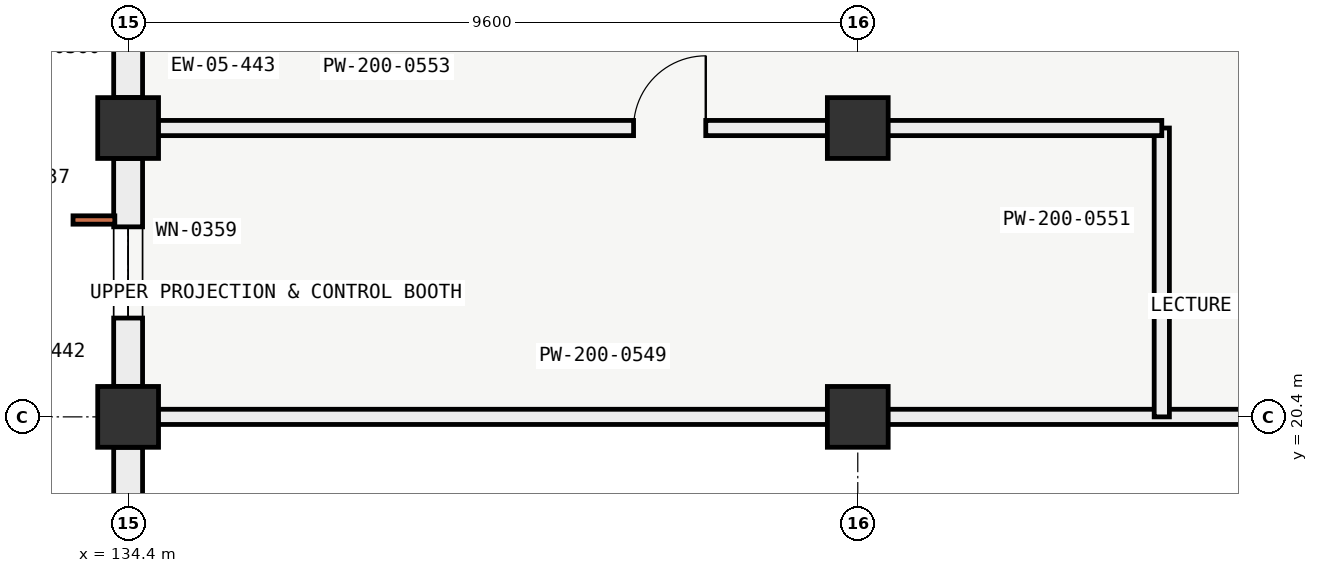
"""IFC4 building model, lengths in metres.
Left out: names, types, materials, properties, quantities, classifications, styles, units other than length and angle.
Written with IfcOpenShell. Run it as: python <this file> out.ifc"""

import sys

from ifc_helpers import new_model, si_unit, direction, frame, frame_2d, origin, origin_2d, place, context, subcontext, project, spatial, rectangle, extrude, element, fill, save


model = new_model("IFC4")
c1 = context("Model", 3, precision=1e-05, world=origin(), true_north=direction((0.0, 1.0)))
c2 = subcontext(c1, "Body", "Model", "MODEL_VIEW")
j1 = project(units=[si_unit("LENGTHUNIT", "METRE"), si_unit("PLANEANGLEUNIT", "RADIAN")], contexts=[c1])
p1 = place(None, origin())
s1 = spatial("IfcSite", under=j1, at=p1, CompositionType="ELEMENT")
p2 = place(p1, origin())
s2 = spatial("IfcBuilding", under=s1, at=p2, CompositionType="ELEMENT")
p3 = place(p2, frame((0.0, 0.0, 5.4)))
s3 = spatial("IfcBuildingStorey", under=s2, at=p3, CompositionType="ELEMENT", Elevation=5.4)
for number, where, z_axis, x_axis in (
    (1, (134.4, 20.4, 0.0), (0.0, 0.0, 1.0), (1.0, 0.0, 0.0)),
    (2, (134.4, 24.2, 0.0), (0.0, 0.0, 1.0), (1.0, 0.0, 0.0)),
    (3, (144.0, 20.4, 0.0), (0.0, 0.0, 1.0), (1.0, 0.0, 0.0)),
    (4, (144.0, 24.2, 0.0), (0.0, 0.0, 1.0), (1.0, 0.0, 0.0)),
):
    element("IfcColumn", number, at=place(p3, frame(where, z_axis=z_axis, x_axis=x_axis)), inside=s3, PredefinedType="COLUMN", context=c2, shape_type="SweptSolid", body=[
        extrude(rectangle(XDim=0.8, YDim=0.8, at=origin_2d()), origin(), (0.0, 0.0, 1.0), 4.2),
    ])
p4 = place(p3, frame((134.4, 10.601, 0.0), z_axis=(0.0, 0.0, 1.0), x_axis=(0.0, 1.0, 0.0)))
e5 = element("IfcWall", 5, at=p4, inside=s3, PredefinedType="SOLIDWALL", context=c2, shape_type="SweptSolid", body=[
    extrude(rectangle(XDim=9.398, YDim=0.38, at=frame_2d((4.699, 0.0))), origin(), (0.0, 0.0, 1.0), 2.2),
])
p5 = place(p4, frame((1.35, 0.0, 0.85)))
e6 = element("IfcOpeningElement", 6, at=p5, cuts=e5, PredefinedType="OPENING", context=c2, shape_type="SweptSolid", body=[
    extrude(rectangle(XDim=0.75, YDim=1.1, at=frame_2d((0.375, 0.55))), frame((0.0, 0.2, 0.0), z_axis=(0.0, -1.0, 0.0), x_axis=(1.0, 0.0, 0.0)), (0.0, 0.0, 1.0), 0.4),
])
p6 = place(p4, frame((5.25, 0.0, 0.85)))
e7 = element("IfcOpeningElement", 7, at=p6, cuts=e5, PredefinedType="OPENING", context=c2, shape_type="SweptSolid", body=[
    extrude(rectangle(XDim=0.75, YDim=1.1, at=frame_2d((0.375, 0.55))), frame((0.0, 0.2, 0.0), z_axis=(0.0, -1.0, 0.0), x_axis=(1.0, 0.0, 0.0)), (0.0, 0.0, 1.0), 0.4),
])
p7 = place(p3, frame((134.4, 20.801, 0.0), z_axis=(0.0, 0.0, 1.0), x_axis=(0.0, 1.0, 0.0)))
e8 = element("IfcWall", 8, at=p7, inside=s3, PredefinedType="SOLIDWALL", context=c2, shape_type="SweptSolid", body=[
    extrude(rectangle(XDim=2.998, YDim=0.38, at=frame_2d((1.499, 0.0))), origin(), (0.0, 0.0, 1.0), 3.25),
])
p8 = place(p7, frame((0.899, 0.0, 0.9)))
e9 = element("IfcOpeningElement", 9, at=p8, cuts=e8, PredefinedType="OPENING", context=c2, shape_type="SweptSolid", body=[
    extrude(rectangle(XDim=1.2, YDim=1.8, at=frame_2d((0.6, 0.9))), frame((0.0, 0.2, 0.0), z_axis=(0.0, -1.0, 0.0), x_axis=(1.0, 0.0, 0.0)), (0.0, 0.0, 1.0), 0.4),
])
p9 = place(p3, frame((134.4, 24.601, 0.0), z_axis=(0.0, 0.0, 1.0), x_axis=(0.0, 1.0, 0.0)))
e10 = element("IfcWall", 10, at=p9, inside=s3, PredefinedType="SOLIDWALL", context=c2, shape_type="SweptSolid", body=[
    extrude(rectangle(XDim=2.398, YDim=0.38, at=frame_2d((1.199, 0.0))), origin(), (0.0, 0.0, 1.0), 3.25),
])
p10 = place(p9, frame((0.824, 0.0, 0.75)))
e11 = element("IfcOpeningElement", 11, at=p10, cuts=e10, PredefinedType="OPENING", context=c2, shape_type="SweptSolid", body=[
    extrude(rectangle(XDim=0.75, YDim=1.1, at=frame_2d((0.375, 0.55))), frame((0.0, 0.2, 0.0), z_axis=(0.0, -1.0, 0.0), x_axis=(1.0, 0.0, 0.0)), (0.0, 0.0, 1.0), 0.4),
])
p11 = place(p3, frame((134.55, 20.4, 0.0), z_axis=(0.0, 0.0, 1.0), x_axis=(1.0, 0.0, 0.0)))
e12 = element("IfcWall", 12, at=p11, inside=s3, PredefinedType="PARTITIONING", context=c2, shape_type="SweptSolid", body=[
    extrude(rectangle(XDim=19.05, YDim=0.2, at=frame_2d((9.525, 0.0))), origin(), (0.0, 0.0, 1.0), 3.2),
])
p12 = place(p3, frame((148.0, 20.4, 0.0), z_axis=(0.0, 0.0, 1.0), x_axis=(0.0, 1.0, 0.0)))
e13 = element("IfcWall", 13, at=p12, inside=s3, PredefinedType="PARTITIONING", context=c2, shape_type="SweptSolid", body=[
    extrude(rectangle(XDim=3.8, YDim=0.2, at=frame_2d((1.9, 0.0))), origin(), (0.0, 0.0, 1.0), 3.2),
])
p13 = place(p3, frame((134.55, 24.2, 0.0), z_axis=(0.0, 0.0, 1.0), x_axis=(1.0, 0.0, 0.0)))
e14 = element("IfcWall", 14, at=p13, inside=s3, PredefinedType="PARTITIONING", context=c2, shape_type="SweptSolid", body=[
    extrude(rectangle(XDim=13.45, YDim=0.2, at=frame_2d((6.725, 0.0))), origin(), (0.0, 0.0, 1.0), 3.25),
])
p14 = place(p13, frame((6.5, 0.0, 0.0)))
e15 = element("IfcOpeningElement", 15, at=p14, cuts=e14, PredefinedType="OPENING", context=c2, shape_type="SweptSolid", body=[
    extrude(rectangle(XDim=0.95, YDim=2.1, at=frame_2d((0.475, 1.05))), frame((0.0, 0.11, 0.0), z_axis=(0.0, -1.0, 0.0), x_axis=(1.0, 0.0, 0.0)), (0.0, 0.0, 1.0), 0.22),
])
p15 = place(p8, origin())
e16 = element("IfcWindow", 16, at=p15, inside=s3, PartitioningType="SINGLE_PANEL", PredefinedType="WINDOW", context=c2, shape_type="SweptSolid", body=[
    extrude(rectangle(XDim=1.2, YDim=1.8, at=frame_2d((0.6, 0.9))), frame((0.0, 0.03, 0.0), z_axis=(0.0, -1.0, 0.0), x_axis=(1.0, 0.0, 0.0)), (0.0, 0.0, 1.0), 0.06),
])
fill(e9, e16)
p16 = place(p14, origin())
e17 = element("IfcDoor", 17, at=p16, inside=s3, OperationType="SINGLE_SWING_RIGHT", PredefinedType="DOOR", context=c2, shape_type="SweptSolid", body=[
    extrude(rectangle(XDim=0.95, YDim=2.1, at=frame_2d((0.475, 1.05))), frame((0.0, 0.025, 0.0), z_axis=(0.0, -1.0, 0.0), x_axis=(1.0, 0.0, 0.0)), (0.0, 0.0, 1.0), 0.05),
])
fill(e15, e17)
save(model, sys.argv[1])
